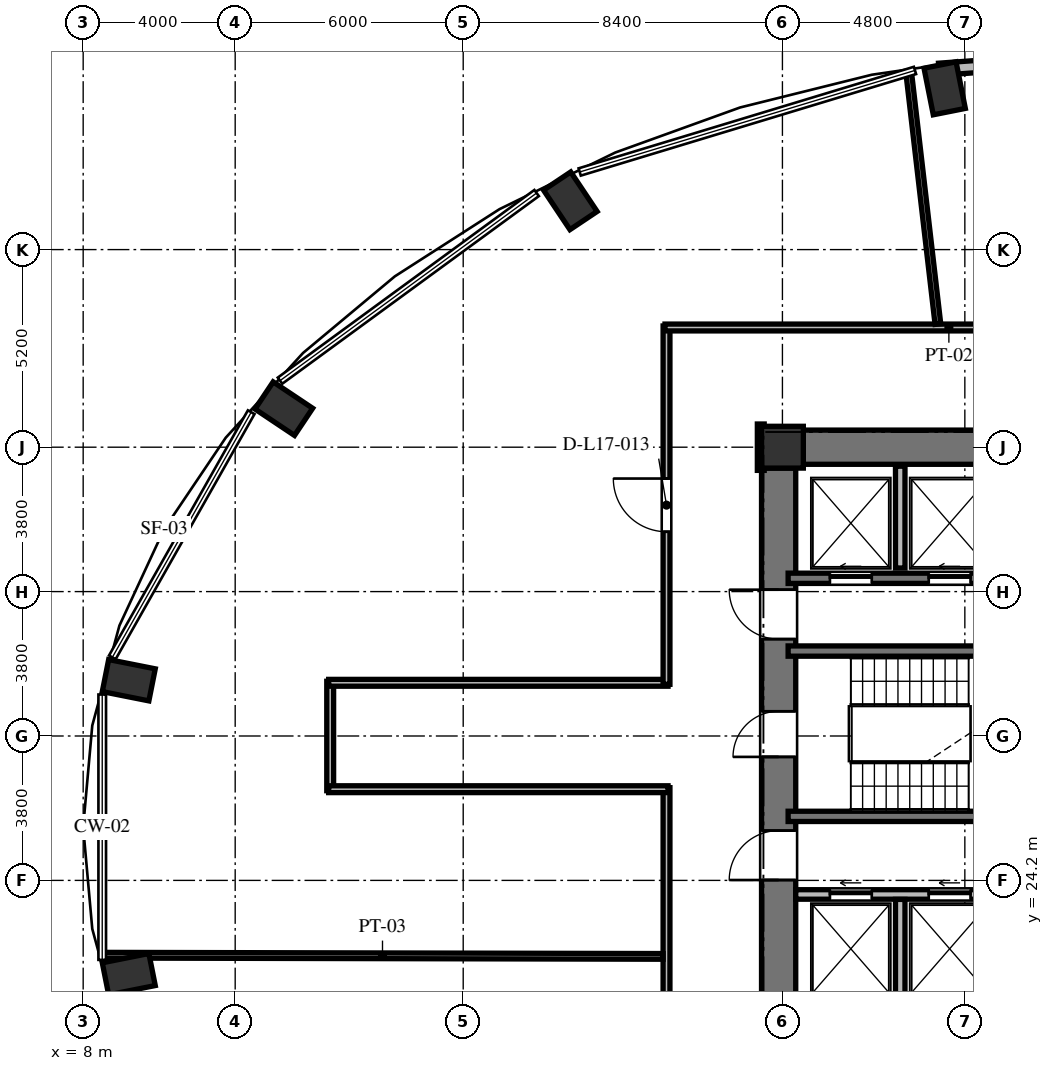
"""IFC4 building model, lengths in metres.
Left out: names, types, materials, properties, quantities, classifications, styles, units other than length and angle.
Written with IfcOpenShell. Run it as: python <this file> out.ifc"""

import sys

from ifc_helpers import new_model, si_unit, direction, frame, frame_2d, origin, origin_2d, place, context, subcontext, project, spatial, rectangle, extrude, element, fill, save


model = new_model("IFC4")
c1 = context("Model", 3, precision=1e-05, world=origin(), true_north=direction((0.0, 1.0)))
c2 = subcontext(c1, "Body", "Model", "MODEL_VIEW")
j1 = project(units=[si_unit("LENGTHUNIT", "METRE"), si_unit("PLANEANGLEUNIT", "RADIAN")], contexts=[c1])
p1 = place(None, origin())
s1 = spatial("IfcSite", under=j1, at=p1, CompositionType="ELEMENT")
p2 = place(p1, origin())
s2 = spatial("IfcBuilding", under=s1, at=p2, CompositionType="ELEMENT")
p3 = place(p2, frame((0.0, 0.0, 68.976)))
s3 = spatial("IfcBuildingStorey", under=s2, at=p3, CompositionType="ELEMENT", Elevation=68.976)
for number, where, z_axis, x_axis in (
    (1, (30.669, 45.044, 0.0), (0.0, 0.0, 1.0), (-0.195, 0.981, 0.0)),
    (2, (20.819, 42.084, 0.0), (0.0, 0.0, 1.0), (-0.556, 0.831, 0.0)),
    (3, (13.28, 36.614, 0.0), (0.0, 0.0, 1.0), (-0.831, 0.556, 0.0)),
    (4, (9.2, 29.468, 0.0), (0.0, 0.0, 1.0), (-0.981, 0.195, 0.0)),
    (5, (9.2, 21.732, 0.0), (0.0, 0.0, 1.0), (-0.981, -0.195, 0.0)),
):
    element("IfcColumn", number, at=place(p3, frame(where, z_axis=z_axis, x_axis=x_axis)), inside=s3, PredefinedType="COLUMN", context=c2, shape_type="SweptSolid", body=[
        extrude(rectangle(XDim=1.25, YDim=0.86, at=origin_2d()), origin(), (0.0, 0.0, 1.0), 3.648),
    ])
p4 = place(p3, frame((26.4, 35.6, 0.0), z_axis=(0.0, 0.0, 1.0), x_axis=(1.0, 0.0, 0.0)))
e6 = element("IfcColumn", 6, at=p4, inside=s3, PredefinedType="COLUMN", context=c2, shape_type="SweptSolid", body=[
    extrude(rectangle(XDim=1.1, YDim=1.1, at=origin_2d()), origin(), (0.0, 0.0, 1.0), 3.648),
])
p5 = place(p3, frame((26.3, 20.95, 0.0), z_axis=(0.0, 0.0, 1.0), x_axis=(0.0, 1.0, 0.0)))
e7 = element("IfcWall", 7, at=p5, inside=s3, PredefinedType="SHEAR", context=c2, shape_type="SweptSolid", body=[
    extrude(rectangle(XDim=14.1, YDim=0.9, at=frame_2d((7.05, 0.0))), origin(), (0.0, 0.0, 1.0), 3.648),
])
p6 = place(p5, frame((6.5, 0.0, 0.0)))
e8 = element("IfcOpeningElement", 8, at=p6, cuts=e7, PredefinedType="OPENING", context=c2, shape_type="SweptSolid", body=[
    extrude(rectangle(XDim=1.2, YDim=2.15, at=frame_2d((0.6, 1.075))), frame((0.0, 0.46, 0.0), z_axis=(0.0, -1.0, 0.0), x_axis=(1.0, 0.0, 0.0)), (0.0, 0.0, 1.0), 0.92),
])
p7 = place(p5, frame((9.6, 0.0, 0.0)))
e9 = element("IfcOpeningElement", 9, at=p7, cuts=e7, PredefinedType="OPENING", context=c2, shape_type="SweptSolid", body=[
    extrude(rectangle(XDim=1.3, YDim=2.2, at=frame_2d((0.65, 1.1))), frame((0.0, 0.46, 0.0), z_axis=(0.0, -1.0, 0.0), x_axis=(1.0, 0.0, 0.0)), (0.0, 0.0, 1.0), 0.92),
])
p8 = place(p5, frame((3.26, 0.0, 0.0)))
e10 = element("IfcOpeningElement", 10, at=p8, cuts=e7, PredefinedType="OPENING", context=c2, shape_type="SweptSolid", body=[
    extrude(rectangle(XDim=1.3, YDim=2.2, at=frame_2d((0.65, 1.1))), frame((0.0, 0.46, 0.0), z_axis=(0.0, -1.0, 0.0), x_axis=(1.0, 0.0, 0.0)), (0.0, 0.0, 1.0), 0.92),
])
p9 = place(p3, frame((26.95, 35.6, 0.0), z_axis=(0.0, 0.0, 1.0), x_axis=(1.0, 0.0, 0.0)))
e11 = element("IfcWall", 11, at=p9, inside=s3, PredefinedType="SHEAR", context=c2, shape_type="SweptSolid", body=[
    extrude(rectangle(XDim=5.3, YDim=0.9, at=frame_2d((2.65, 0.0))), origin(), (0.0, 0.0, 1.0), 3.648),
])
p10 = place(p3, frame((36.179, 45.953, 0.0), z_axis=(0.0, 0.0, 1.0), x_axis=(-0.997421878774, -0.071760683825, 0.0)))
e12 = element("IfcWall", 12, at=p10, inside=s3, PredefinedType="SOLIDWALL", context=c2, shape_type="SweptSolid", body=[
    extrude(rectangle(XDim=5.675, YDim=0.32, at=frame_2d((2.837, 0.0))), origin(), (0.0, 0.0, 1.0), 3.428),
])
p11 = place(p10, frame((2.237, 0.0, 0.85)))
e13 = element("IfcOpeningElement", 13, at=p11, cuts=e12, PredefinedType="OPENING", context=c2, shape_type="SweptSolid", body=[
    extrude(rectangle(XDim=1.2, YDim=1.8, at=frame_2d((0.6, 0.9))), frame((0.0, 0.17, 0.0), z_axis=(0.0, -1.0, 0.0), x_axis=(1.0, 0.0, 0.0)), (0.0, 0.0, 1.0), 0.34),
])
for number, where, z_axis, x_axis in (
    (14, (26.55, 30.235, 0.0), (0.0, 0.0, 1.0), (1.0, 0.0, 0.0)),
    (15, (26.55, 25.885, 0.0), (0.0, 0.0, 1.0), (1.0, 0.0, 0.0)),
):
    element("IfcWall", number, at=place(p3, frame(where, z_axis=z_axis, x_axis=x_axis)), inside=s3, PredefinedType="SHEAR", context=c2, shape_type="SweptSolid", body=[
        extrude(rectangle(XDim=7.985, YDim=0.27, at=frame_2d((3.992, 0.0))), origin(), (0.0, 0.0, 1.0), 3.648),
    ])
p12 = place(p3, frame((26.55, 32.15, 0.0), z_axis=(0.0, 0.0, 1.0), x_axis=(1.0, 0.0, 0.0)))
e16 = element("IfcWall", 16, at=p12, inside=s3, PredefinedType="SHEAR", context=c2, shape_type="SweptSolid", body=[
    extrude(rectangle(XDim=16.4, YDim=0.27, at=frame_2d((8.2, 0.0))), origin(), (0.0, 0.0, 1.0), 3.648),
])
p13 = place(p12, frame((1.1, 0.0, 0.0)))
e17 = element("IfcOpeningElement", 17, at=p13, cuts=e16, PredefinedType="OPENING", context=c2, shape_type="SweptSolid", body=[
    extrude(rectangle(XDim=1.1, YDim=2.2, at=frame_2d((0.55, 1.1))), frame((0.0, 0.145, 0.0), z_axis=(0.0, -1.0, 0.0), x_axis=(1.0, 0.0, 0.0)), (0.0, 0.0, 1.0), 0.29),
])
p14 = place(p12, frame((3.7, 0.0, 0.0)))
e18 = element("IfcOpeningElement", 18, at=p14, cuts=e16, PredefinedType="OPENING", context=c2, shape_type="SweptSolid", body=[
    extrude(rectangle(XDim=1.1, YDim=2.2, at=frame_2d((0.55, 1.1))), frame((0.0, 0.145, 0.0), z_axis=(0.0, -1.0, 0.0), x_axis=(1.0, 0.0, 0.0)), (0.0, 0.0, 1.0), 0.29),
])
p15 = place(p12, frame((6.5, 0.0, 0.0)))
e19 = element("IfcOpeningElement", 19, at=p15, cuts=e16, PredefinedType="OPENING", context=c2, shape_type="SweptSolid", body=[
    extrude(rectangle(XDim=1.1, YDim=2.2, at=frame_2d((0.55, 1.1))), frame((0.0, 0.145, 0.0), z_axis=(0.0, -1.0, 0.0), x_axis=(1.0, 0.0, 0.0)), (0.0, 0.0, 1.0), 0.29),
])
p16 = place(p12, frame((9.1, 0.0, 0.0)))
e20 = element("IfcOpeningElement", 20, at=p16, cuts=e16, PredefinedType="OPENING", context=c2, shape_type="SweptSolid", body=[
    extrude(rectangle(XDim=1.1, YDim=2.2, at=frame_2d((0.55, 1.1))), frame((0.0, 0.145, 0.0), z_axis=(0.0, -1.0, 0.0), x_axis=(1.0, 0.0, 0.0)), (0.0, 0.0, 1.0), 0.29),
])
p17 = place(p12, frame((11.9, 0.0, 0.0)))
e21 = element("IfcOpeningElement", 21, at=p17, cuts=e16, PredefinedType="OPENING", context=c2, shape_type="SweptSolid", body=[
    extrude(rectangle(XDim=1.1, YDim=2.2, at=frame_2d((0.55, 1.1))), frame((0.0, 0.145, 0.0), z_axis=(0.0, -1.0, 0.0), x_axis=(1.0, 0.0, 0.0)), (0.0, 0.0, 1.0), 0.29),
])
p18 = place(p12, frame((14.5, 0.0, 0.0)))
e22 = element("IfcOpeningElement", 22, at=p18, cuts=e16, PredefinedType="OPENING", context=c2, shape_type="SweptSolid", body=[
    extrude(rectangle(XDim=1.1, YDim=2.2, at=frame_2d((0.55, 1.1))), frame((0.0, 0.145, 0.0), z_axis=(0.0, -1.0, 0.0), x_axis=(1.0, 0.0, 0.0)), (0.0, 0.0, 1.0), 0.29),
])
p19 = place(p3, frame((26.75, 23.83, 0.0), z_axis=(0.0, 0.0, 1.0), x_axis=(1.0, 0.0, 0.0)))
e23 = element("IfcWall", 23, at=p19, inside=s3, PredefinedType="SOLIDWALL", context=c2, shape_type="SweptSolid", body=[
    extrude(rectangle(XDim=16.2, YDim=0.25, at=frame_2d((8.1, 0.0))), origin(), (0.0, 0.0, 1.0), 3.428),
])
p20 = place(p19, frame((0.9, 0.0, 0.0)))
e24 = element("IfcOpeningElement", 24, at=p20, cuts=e23, PredefinedType="OPENING", context=c2, shape_type="SweptSolid", body=[
    extrude(rectangle(XDim=1.1, YDim=2.2, at=frame_2d((0.55, 1.1))), frame((0.0, 0.135, 0.0), z_axis=(0.0, -1.0, 0.0), x_axis=(1.0, 0.0, 0.0)), (0.0, 0.0, 1.0), 0.27),
])
p21 = place(p19, frame((3.5, 0.0, 0.0)))
e25 = element("IfcOpeningElement", 25, at=p21, cuts=e23, PredefinedType="OPENING", context=c2, shape_type="SweptSolid", body=[
    extrude(rectangle(XDim=1.1, YDim=2.2, at=frame_2d((0.55, 1.1))), frame((0.0, 0.135, 0.0), z_axis=(0.0, -1.0, 0.0), x_axis=(1.0, 0.0, 0.0)), (0.0, 0.0, 1.0), 0.27),
])
p22 = place(p19, frame((6.3, 0.0, 0.0)))
e26 = element("IfcOpeningElement", 26, at=p22, cuts=e23, PredefinedType="OPENING", context=c2, shape_type="SweptSolid", body=[
    extrude(rectangle(XDim=1.1, YDim=2.2, at=frame_2d((0.55, 1.1))), frame((0.0, 0.135, 0.0), z_axis=(0.0, -1.0, 0.0), x_axis=(1.0, 0.0, 0.0)), (0.0, 0.0, 1.0), 0.27),
])
p23 = place(p19, frame((8.9, 0.0, 0.0)))
e27 = element("IfcOpeningElement", 27, at=p23, cuts=e23, PredefinedType="OPENING", context=c2, shape_type="SweptSolid", body=[
    extrude(rectangle(XDim=1.1, YDim=2.2, at=frame_2d((0.55, 1.1))), frame((0.0, 0.135, 0.0), z_axis=(0.0, -1.0, 0.0), x_axis=(1.0, 0.0, 0.0)), (0.0, 0.0, 1.0), 0.27),
])
p24 = place(p19, frame((11.7, 0.0, 0.0)))
e28 = element("IfcOpeningElement", 28, at=p24, cuts=e23, PredefinedType="OPENING", context=c2, shape_type="SweptSolid", body=[
    extrude(rectangle(XDim=1.1, YDim=2.2, at=frame_2d((0.55, 1.1))), frame((0.0, 0.135, 0.0), z_axis=(0.0, -1.0, 0.0), x_axis=(1.0, 0.0, 0.0)), (0.0, 0.0, 1.0), 0.27),
])
p25 = place(p19, frame((14.15, 0.0, 0.0)))
e29 = element("IfcOpeningElement", 29, at=p25, cuts=e23, PredefinedType="OPENING", context=c2, shape_type="SweptSolid", body=[
    extrude(rectangle(XDim=1.4, YDim=2.3, at=frame_2d((0.7, 1.15))), frame((0.0, 0.135, 0.0), z_axis=(0.0, -1.0, 0.0), x_axis=(1.0, 0.0, 0.0)), (0.0, 0.0, 1.0), 0.27),
])
p26 = place(p3, frame((29.5, 32.42, 0.0), z_axis=(0.0, 0.0, 1.0), x_axis=(0.0, 1.0, 0.0)))
e30 = element("IfcWall", 30, at=p26, inside=s3, PredefinedType="SOLIDWALL", context=c2, shape_type="SweptSolid", body=[
    extrude(rectangle(XDim=2.68, YDim=0.25, at=frame_2d((1.34, 0.0))), origin(), (0.0, 0.0, 1.0), 3.428),
])
p27 = place(p3, frame((29.5, 20.9, 0.0), z_axis=(0.0, 0.0, 1.0), x_axis=(0.0, 1.0, 0.0)))
e31 = element("IfcWall", 31, at=p27, inside=s3, PredefinedType="SOLIDWALL", context=c2, shape_type="SweptSolid", body=[
    extrude(rectangle(XDim=2.8, YDim=0.25, at=frame_2d((1.4, 0.0))), origin(), (0.0, 0.0, 1.0), 3.428),
])
p28 = place(p3, frame((14.5, 26.56, 0.0), z_axis=(0.0, 0.0, 1.0), x_axis=(0.0, 1.0, 0.0)))
e32 = element("IfcWall", 32, at=p28, inside=s3, PredefinedType="PARTITIONING", context=c2, shape_type="SweptSolid", body=[
    extrude(rectangle(XDim=2.88, YDim=0.18, at=frame_2d((1.44, 0.0))), origin(), (0.0, 0.0, 1.0), 3.428),
])
p29 = place(p3, frame((14.46, 29.4, 0.0), z_axis=(0.0, 0.0, 1.0), x_axis=(1.0, 0.0, 0.0)))
e33 = element("IfcWall", 33, at=p29, inside=s3, PredefinedType="PARTITIONING", context=c2, shape_type="SweptSolid", body=[
    extrude(rectangle(XDim=8.93, YDim=0.18, at=frame_2d((4.465, 0.0))), origin(), (0.0, 0.0, 1.0), 3.428),
])
p30 = place(p3, frame((23.35, 29.36, 0.0), z_axis=(0.0, 0.0, 1.0), x_axis=(0.0, 1.0, 0.0)))
e34 = element("IfcWall", 34, at=p30, inside=s3, PredefinedType="PARTITIONING", context=c2, shape_type="SweptSolid", body=[
    extrude(rectangle(XDim=9.43, YDim=0.18, at=frame_2d((4.715, 0.0))), origin(), (0.0, 0.0, 1.0), 3.428),
])
p31 = place(p30, frame((4.015, 0.0, 0.0)))
e35 = element("IfcOpeningElement", 35, at=p31, cuts=e34, PredefinedType="OPENING", context=c2, shape_type="SweptSolid", body=[
    extrude(rectangle(XDim=1.4, YDim=2.2, at=frame_2d((0.7, 1.1))), frame((0.0, 0.1, 0.0), z_axis=(0.0, -1.0, 0.0), x_axis=(1.0, 0.0, 0.0)), (0.0, 0.0, 1.0), 0.2),
])
p32 = place(p3, frame((23.31, 38.75, 0.0), z_axis=(0.0, 0.0, 1.0), x_axis=(1.0, 0.0, 0.0)))
e36 = element("IfcWall", 36, at=p32, inside=s3, PredefinedType="PARTITIONING", context=c2, shape_type="SweptSolid", body=[
    extrude(rectangle(XDim=29.88, YDim=0.18, at=frame_2d((14.94, 0.0))), origin(), (0.0, 0.0, 1.0), 3.053),
])
p33 = place(p32, frame((25.176, 0.0, 0.0)))
e37 = element("IfcOpeningElement", 37, at=p33, cuts=e36, PredefinedType="OPENING", context=c2, shape_type="SweptSolid", body=[
    extrude(rectangle(XDim=1.4, YDim=2.2, at=frame_2d((0.7, 1.1))), frame((0.0, 0.1, 0.0), z_axis=(0.0, -1.0, 0.0), x_axis=(1.0, 0.0, 0.0)), (0.0, 0.0, 1.0), 0.2),
])
p34 = place(p32, frame((17.74, 0.0, 0.0)))
e38 = element("IfcOpeningElement", 38, at=p34, cuts=e36, PredefinedType="OPENING", context=c2, shape_type="SweptSolid", body=[
    extrude(rectangle(XDim=1.4, YDim=2.2, at=frame_2d((0.7, 1.1))), frame((0.0, 0.1, 0.0), z_axis=(0.0, -1.0, 0.0), x_axis=(1.0, 0.0, 0.0)), (0.0, 0.0, 1.0), 0.2),
])
p35 = place(p32, frame((11.236, 0.0, 0.0)))
e39 = element("IfcOpeningElement", 39, at=p35, cuts=e36, PredefinedType="OPENING", context=c2, shape_type="SweptSolid", body=[
    extrude(rectangle(XDim=1.4, YDim=2.2, at=frame_2d((0.7, 1.1))), frame((0.0, 0.1, 0.0), z_axis=(0.0, -1.0, 0.0), x_axis=(1.0, 0.0, 0.0)), (0.0, 0.0, 1.0), 0.2),
])
p36 = place(p3, frame((25.83, 36.21, 0.0), z_axis=(0.0, 0.0, 1.0), x_axis=(0.0, -1.0, 0.0)))
e40 = element("IfcWall", 40, at=p36, inside=s3, PredefinedType="PARTITIONING", context=c2, shape_type="SweptSolid", body=[
    extrude(rectangle(XDim=1.22, YDim=0.18, at=frame_2d((0.61, 0.0))), origin(), (0.0, 0.0, 1.0), 3.428),
])
p37 = place(p3, frame((23.35, 17.36, 0.0), z_axis=(0.0, 0.0, 1.0), x_axis=(0.0, 1.0, 0.0)))
e41 = element("IfcWall", 41, at=p37, inside=s3, PredefinedType="PARTITIONING", context=c2, shape_type="SweptSolid", body=[
    extrude(rectangle(XDim=9.28, YDim=0.18, at=frame_2d((4.64, 0.0))), origin(), (0.0, 0.0, 1.0), 3.428),
])
p38 = place(p3, frame((23.39, 26.6, 0.0), z_axis=(0.0, 0.0, 1.0), x_axis=(-1.0, 0.0, 0.0)))
e42 = element("IfcWall", 42, at=p38, inside=s3, PredefinedType="PARTITIONING", context=c2, shape_type="SweptSolid", body=[
    extrude(rectangle(XDim=8.93, YDim=0.18, at=frame_2d((4.465, 0.0))), origin(), (0.0, 0.0, 1.0), 3.428),
])
p39 = place(p3, frame((8.493, 22.231, 0.0), z_axis=(0.0, 0.0, 1.0), x_axis=(0.999997760873, -0.002116187438, 0.0)))
e43 = element("IfcWall", 43, at=p39, inside=s3, PredefinedType="PARTITIONING", context=c2, shape_type="SweptSolid", body=[
    extrude(rectangle(XDim=14.767, YDim=0.15, at=frame_2d((7.384, 0.0))), origin(), (0.0, 0.0, 1.0), 3.428),
])
p40 = place(p3, frame((30.491, 38.84, 0.0), z_axis=(0.0, 0.0, 1.0), x_axis=(-0.115342161953, 0.993325820502, 0.0)))
e44 = element("IfcWall", 44, at=p40, inside=s3, PredefinedType="PARTITIONING", context=c2, shape_type="SweptSolid", body=[
    extrude(rectangle(XDim=6.672, YDim=0.15, at=frame_2d((3.336, 0.0))), origin(), (0.0, 0.0, 1.0), 3.428),
])
p41 = place(p6, origin())
e45 = element("IfcDoor", 45, at=p41, inside=s3, OperationType="SINGLE_SWING_LEFT", PredefinedType="DOOR", context=c2, shape_type="SweptSolid", body=[
    extrude(rectangle(XDim=1.2, YDim=2.15, at=frame_2d((0.6, 1.075))), frame((0.0, 0.025, 0.0), z_axis=(0.0, -1.0, 0.0), x_axis=(1.0, 0.0, 0.0)), (0.0, 0.0, 1.0), 0.05),
])
fill(e8, e45)
p42 = place(p7, origin())
e46 = element("IfcDoor", 46, at=p42, inside=s3, OperationType="SINGLE_SWING_RIGHT", PredefinedType="DOOR", context=c2, shape_type="SweptSolid", body=[
    extrude(rectangle(XDim=1.3, YDim=2.2, at=frame_2d((0.65, 1.1))), frame((0.0, 0.025, 0.0), z_axis=(0.0, -1.0, 0.0), x_axis=(1.0, 0.0, 0.0)), (0.0, 0.0, 1.0), 0.05),
])
fill(e9, e46)
p43 = place(p8, origin())
e47 = element("IfcDoor", 47, at=p43, inside=s3, OperationType="SINGLE_SWING_LEFT", PredefinedType="DOOR", context=c2, shape_type="SweptSolid", body=[
    extrude(rectangle(XDim=1.3, YDim=2.2, at=frame_2d((0.65, 1.1))), frame((0.0, 0.025, 0.0), z_axis=(0.0, -1.0, 0.0), x_axis=(1.0, 0.0, 0.0)), (0.0, 0.0, 1.0), 0.05),
])
fill(e10, e47)
p44 = place(p13, origin())
e48 = element("IfcDoor", 48, at=p44, inside=s3, OperationType="SLIDING_TO_LEFT", PredefinedType="DOOR", context=c2, shape_type="SweptSolid", body=[
    extrude(rectangle(XDim=1.1, YDim=2.2, at=frame_2d((0.55, 1.1))), frame((0.0, 0.025, 0.0), z_axis=(0.0, -1.0, 0.0), x_axis=(1.0, 0.0, 0.0)), (0.0, 0.0, 1.0), 0.05),
])
fill(e17, e48)
p45 = place(p14, origin())
e49 = element("IfcDoor", 49, at=p45, inside=s3, OperationType="SLIDING_TO_LEFT", PredefinedType="DOOR", context=c2, shape_type="SweptSolid", body=[
    extrude(rectangle(XDim=1.1, YDim=2.2, at=frame_2d((0.55, 1.1))), frame((0.0, 0.025, 0.0), z_axis=(0.0, -1.0, 0.0), x_axis=(1.0, 0.0, 0.0)), (0.0, 0.0, 1.0), 0.05),
])
fill(e18, e49)
p46 = place(p20, origin())
e50 = element("IfcDoor", 50, at=p46, inside=s3, OperationType="SLIDING_TO_LEFT", PredefinedType="DOOR", context=c2, shape_type="SweptSolid", body=[
    extrude(rectangle(XDim=1.1, YDim=2.2, at=frame_2d((0.55, 1.1))), frame((0.0, 0.025, 0.0), z_axis=(0.0, -1.0, 0.0), x_axis=(1.0, 0.0, 0.0)), (0.0, 0.0, 1.0), 0.05),
])
fill(e24, e50)
p47 = place(p21, origin())
e51 = element("IfcDoor", 51, at=p47, inside=s3, OperationType="SLIDING_TO_LEFT", PredefinedType="DOOR", context=c2, shape_type="SweptSolid", body=[
    extrude(rectangle(XDim=1.1, YDim=2.2, at=frame_2d((0.55, 1.1))), frame((0.0, 0.025, 0.0), z_axis=(0.0, -1.0, 0.0), x_axis=(1.0, 0.0, 0.0)), (0.0, 0.0, 1.0), 0.05),
])
fill(e25, e51)
p48 = place(p31, origin())
e52 = element("IfcDoor", 52, at=p48, inside=s3, OperationType="SINGLE_SWING_RIGHT", PredefinedType="DOOR", context=c2, shape_type="SweptSolid", body=[
    extrude(rectangle(XDim=1.4, YDim=2.2, at=frame_2d((0.7, 1.1))), frame((0.0, 0.025, 0.0), z_axis=(0.0, -1.0, 0.0), x_axis=(1.0, 0.0, 0.0)), (0.0, 0.0, 1.0), 0.05),
])
fill(e35, e52)
save(model, sys.argv[1])
